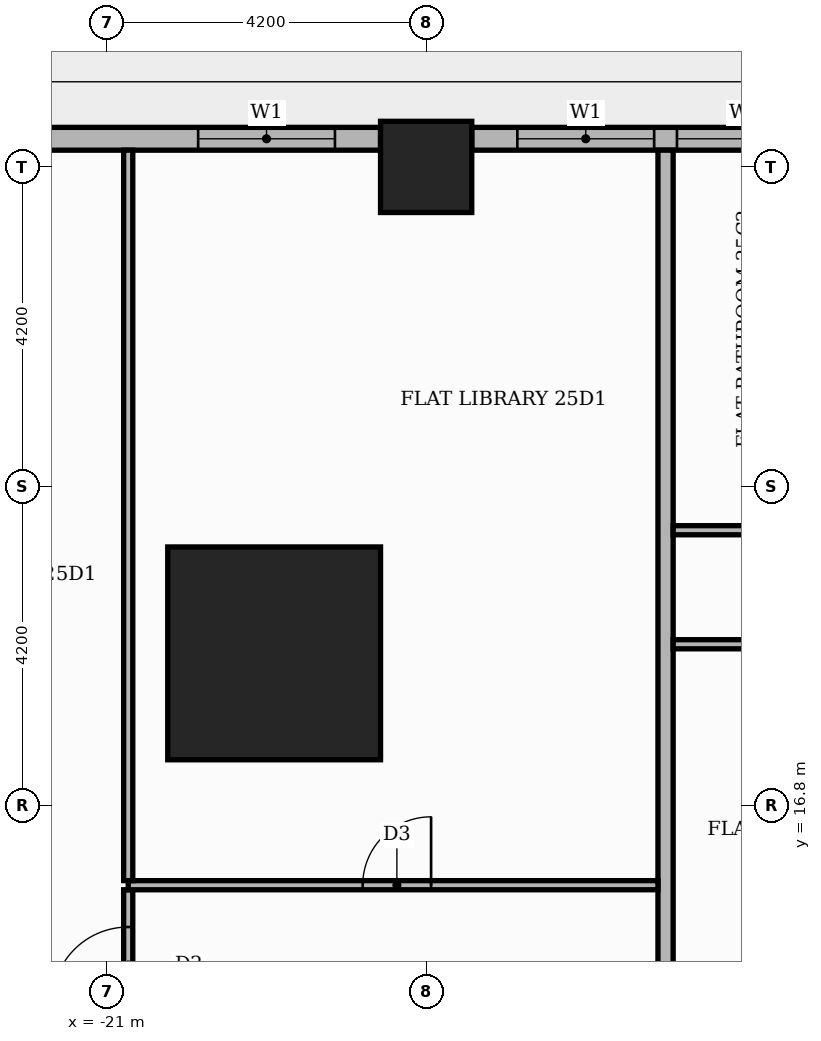
"""IFC4 building model, lengths in metres.
Left out: names, types, materials, properties, quantities, classifications, styles, units other than length and angle.
Written with IfcOpenShell. Run it as: python <this file> out.ifc"""

import sys

from ifc_helpers import new_model, si_unit, direction, frame, frame_2d, origin, origin_2d, place, context, subcontext, project, spatial, rectangle, extrude, element, fill, save


model = new_model("IFC4")
c1 = context("Model", 3, precision=1e-05, world=origin(), true_north=direction((0.0, 1.0)))
c2 = subcontext(c1, "Body", "Model", "MODEL_VIEW")
j1 = project(units=[si_unit("LENGTHUNIT", "METRE"), si_unit("PLANEANGLEUNIT", "RADIAN")], contexts=[c1])
p1 = place(None, origin())
s1 = spatial("IfcSite", under=j1, at=p1, CompositionType="ELEMENT")
p2 = place(p1, origin())
s2 = spatial("IfcBuilding", under=s1, at=p2, CompositionType="ELEMENT")
p3 = place(p2, frame((0.0, 0.0, 106.5)))
s3 = spatial("IfcBuildingStorey", under=s2, at=p3, CompositionType="ELEMENT", Elevation=106.5)
p4 = place(p3, frame((-18.8, 18.8, 0.0), z_axis=(0.0, 0.0, 1.0), x_axis=(1.0, 0.0, 0.0)))
e1 = element("IfcColumn", 1, at=p4, inside=s3, PredefinedType="COLUMN", context=c2, shape_type="SweptSolid", body=[
    extrude(rectangle(XDim=2.8, YDim=2.8, at=origin_2d()), origin(), (0.0, 0.0, 1.0), 3.9),
])
p5 = place(p3, frame((-16.8, 25.2, 0.0), z_axis=(0.0, 0.0, 1.0), x_axis=(1.0, 0.0, 0.0)))
e2 = element("IfcColumn", 2, at=p5, inside=s3, PredefinedType="COLUMN", context=c2, shape_type="SweptSolid", body=[
    extrude(rectangle(XDim=1.2, YDim=1.2, at=origin_2d()), origin(), (0.0, 0.0, 1.0), 3.9),
])
p6 = place(p3, frame((-9.0, 25.57, 0.0), z_axis=(0.0, 0.0, 1.0), x_axis=(-1.0, 0.0, 0.0)))
e3 = element("IfcWall", 3, at=p6, inside=s3, PredefinedType="STANDARD", context=c2, shape_type="SweptSolid", body=[
    extrude(rectangle(XDim=7.2, YDim=0.3, at=frame_2d((3.6, 0.0))), origin(), (0.0, 0.0, 1.0), 3.48),
])
p7 = place(p6, frame((0.6, 0.0, 0.9)))
e4 = element("IfcOpeningElement", 4, at=p7, cuts=e3, PredefinedType="OPENING", context=c2, shape_type="SweptSolid", body=[
    extrude(rectangle(XDim=1.8, YDim=2.1, at=frame_2d((0.9, 1.05))), frame((0.0, 0.16, 0.0), z_axis=(0.0, -1.0, 0.0), x_axis=(1.0, 0.0, 0.0)), (0.0, 0.0, 1.0), 0.32),
])
p8 = place(p6, frame((2.7, 0.0, 0.9)))
e5 = element("IfcOpeningElement", 5, at=p8, cuts=e3, PredefinedType="OPENING", context=c2, shape_type="SweptSolid", body=[
    extrude(rectangle(XDim=1.8, YDim=2.1, at=frame_2d((0.9, 1.05))), frame((0.0, 0.16, 0.0), z_axis=(0.0, -1.0, 0.0), x_axis=(1.0, 0.0, 0.0)), (0.0, 0.0, 1.0), 0.32),
])
p9 = place(p6, frame((4.8, 0.0, 0.9)))
e6 = element("IfcOpeningElement", 6, at=p9, cuts=e3, PredefinedType="OPENING", context=c2, shape_type="SweptSolid", body=[
    extrude(rectangle(XDim=1.8, YDim=2.1, at=frame_2d((0.9, 1.05))), frame((0.0, 0.16, 0.0), z_axis=(0.0, -1.0, 0.0), x_axis=(1.0, 0.0, 0.0)), (0.0, 0.0, 1.0), 0.32),
])
p10 = place(p3, frame((-17.4, 25.57, 0.0), z_axis=(0.0, 0.0, 1.0), x_axis=(-1.0, 0.0, 0.0)))
e7 = element("IfcWall", 7, at=p10, inside=s3, PredefinedType="STANDARD", context=c2, shape_type="SweptSolid", body=[
    extrude(rectangle(XDim=4.82, YDim=0.3, at=frame_2d((2.41, 0.0))), origin(), (0.0, 0.0, 1.0), 3.48),
])
p11 = place(p10, frame((0.6, 0.0, 0.9)))
e8 = element("IfcOpeningElement", 8, at=p11, cuts=e7, PredefinedType="OPENING", context=c2, shape_type="SweptSolid", body=[
    extrude(rectangle(XDim=1.8, YDim=2.1, at=frame_2d((0.9, 1.05))), frame((0.0, 0.16, 0.0), z_axis=(0.0, -1.0, 0.0), x_axis=(1.0, 0.0, 0.0)), (0.0, 0.0, 1.0), 0.32),
])
p12 = place(p3, frame((-20.72, 13.71, 0.0), z_axis=(0.0, 0.0, 1.0), x_axis=(0.0, 1.0, 0.0)))
e9 = element("IfcWall", 9, at=p12, inside=s3, PredefinedType="PARTITIONING", context=c2, shape_type="SweptSolid", body=[
    extrude(rectangle(XDim=1.98, YDim=0.12, at=frame_2d((0.99, 0.0))), origin(), (0.0, 0.0, 1.0), 3.48),
])
p13 = place(p12, frame((0.49, 0.0, 0.0)))
e10 = element("IfcOpeningElement", 10, at=p13, cuts=e9, PredefinedType="OPENING", context=c2, shape_type="SweptSolid", body=[
    extrude(rectangle(XDim=1.0, YDim=2.1, at=frame_2d((0.5, 1.05))), frame((0.0, 0.07, 0.0), z_axis=(0.0, -1.0, 0.0), x_axis=(1.0, 0.0, 0.0)), (0.0, 0.0, 1.0), 0.14),
])
p14 = place(p3, frame((-13.65, 13.75, 0.0), z_axis=(0.0, 0.0, 1.0), x_axis=(0.0, 1.0, 0.0)))
e11 = element("IfcWall", 11, at=p14, inside=s3, PredefinedType="PARTITIONING", context=c2, shape_type="SweptSolid", body=[
    extrude(rectangle(XDim=11.67, YDim=0.2, at=frame_2d((5.835, 0.0))), origin(), (0.0, 0.0, 1.0), 3.48),
])
p15 = place(p3, frame((-20.72, 15.75, 0.0), z_axis=(0.0, 0.0, 1.0), x_axis=(1.0, 0.0, 0.0)))
e12 = element("IfcWall", 12, at=p15, inside=s3, PredefinedType="PARTITIONING", context=c2, shape_type="SweptSolid", body=[
    extrude(rectangle(XDim=6.97, YDim=0.12, at=frame_2d((3.485, 0.0))), origin(), (0.0, 0.0, 1.0), 3.48),
])
p16 = place(p15, frame((3.085, 0.0, 0.0)))
e13 = element("IfcOpeningElement", 13, at=p16, cuts=e12, PredefinedType="OPENING", context=c2, shape_type="SweptSolid", body=[
    extrude(rectangle(XDim=0.9, YDim=2.1, at=frame_2d((0.45, 1.05))), frame((0.0, 0.07, 0.0), z_axis=(0.0, -1.0, 0.0), x_axis=(1.0, 0.0, 0.0)), (0.0, 0.0, 1.0), 0.14),
])
p17 = place(p3, frame((-20.72, 15.81, 0.0), z_axis=(0.0, 0.0, 1.0), x_axis=(0.0, 1.0, 0.0)))
e14 = element("IfcWall", 14, at=p17, inside=s3, PredefinedType="PARTITIONING", context=c2, shape_type="SweptSolid", body=[
    extrude(rectangle(XDim=9.61, YDim=0.12, at=frame_2d((4.805, 0.0))), origin(), (0.0, 0.0, 1.0), 3.48),
])
p18 = place(p3, frame((-13.55, 18.92, 0.0), z_axis=(0.0, 0.0, 1.0), x_axis=(1.0, 0.0, 0.0)))
e15 = element("IfcWall", 15, at=p18, inside=s3, PredefinedType="PARTITIONING", context=c2, shape_type="SweptSolid", body=[
    extrude(rectangle(XDim=12.5, YDim=0.12, at=frame_2d((6.25, 0.0))), origin(), (0.0, 0.0, 1.0), 3.48),
])
p19 = place(p18, frame((9.05, 0.0, 0.0)))
e16 = element("IfcOpeningElement", 16, at=p19, cuts=e15, PredefinedType="OPENING", context=c2, shape_type="SweptSolid", body=[
    extrude(rectangle(XDim=0.9, YDim=2.1, at=frame_2d((0.45, 1.05))), frame((0.0, 0.07, 0.0), z_axis=(0.0, -1.0, 0.0), x_axis=(1.0, 0.0, 0.0)), (0.0, 0.0, 1.0), 0.14),
])
p20 = place(p18, frame((4.7, 0.0, 0.0)))
e17 = element("IfcOpeningElement", 17, at=p20, cuts=e15, PredefinedType="OPENING", context=c2, shape_type="SweptSolid", body=[
    extrude(rectangle(XDim=0.9, YDim=2.1, at=frame_2d((0.45, 1.05))), frame((0.0, 0.07, 0.0), z_axis=(0.0, -1.0, 0.0), x_axis=(1.0, 0.0, 0.0)), (0.0, 0.0, 1.0), 0.14),
])
p21 = place(p18, frame((1.4, 0.0, 0.0)))
e18 = element("IfcOpeningElement", 18, at=p21, cuts=e15, PredefinedType="OPENING", context=c2, shape_type="SweptSolid", body=[
    extrude(rectangle(XDim=0.9, YDim=2.1, at=frame_2d((0.45, 1.05))), frame((0.0, 0.07, 0.0), z_axis=(0.0, -1.0, 0.0), x_axis=(1.0, 0.0, 0.0)), (0.0, 0.0, 1.0), 0.14),
])
p22 = place(p3, frame((-13.55, 20.42, 0.0), z_axis=(0.0, 0.0, 1.0), x_axis=(1.0, 0.0, 0.0)))
e19 = element("IfcWall", 19, at=p22, inside=s3, PredefinedType="PARTITIONING", context=c2, shape_type="SweptSolid", body=[
    extrude(rectangle(XDim=18.7, YDim=0.12, at=frame_2d((9.35, 0.0))), origin(), (0.0, 0.0, 1.0), 3.48),
])
p23 = place(p22, frame((14.1, 0.0, 0.0)))
e20 = element("IfcOpeningElement", 20, at=p23, cuts=e19, PredefinedType="OPENING", context=c2, shape_type="SweptSolid", body=[
    extrude(rectangle(XDim=1.0, YDim=2.1, at=frame_2d((0.5, 1.05))), frame((0.0, 0.07, 0.0), z_axis=(0.0, -1.0, 0.0), x_axis=(1.0, 0.0, 0.0)), (0.0, 0.0, 1.0), 0.14),
])
p24 = place(p22, frame((6.8, 0.0, 0.0)))
e21 = element("IfcOpeningElement", 21, at=p24, cuts=e19, PredefinedType="OPENING", context=c2, shape_type="SweptSolid", body=[
    extrude(rectangle(XDim=0.9, YDim=2.1, at=frame_2d((0.45, 1.05))), frame((0.0, 0.07, 0.0), z_axis=(0.0, -1.0, 0.0), x_axis=(1.0, 0.0, 0.0)), (0.0, 0.0, 1.0), 0.14),
])
p25 = place(p8, origin())
e22 = element("IfcWindow", 22, at=p25, inside=s3, PartitioningType="SINGLE_PANEL", PredefinedType="WINDOW", context=c2, shape_type="SweptSolid", body=[
    extrude(rectangle(XDim=1.8, YDim=2.1, at=frame_2d((0.9, 1.05))), frame((0.0, 0.03, 0.0), z_axis=(0.0, -1.0, 0.0), x_axis=(1.0, 0.0, 0.0)), (0.0, 0.0, 1.0), 0.06),
])
fill(e5, e22)
p26 = place(p9, origin())
e23 = element("IfcWindow", 23, at=p26, inside=s3, PartitioningType="SINGLE_PANEL", PredefinedType="WINDOW", context=c2, shape_type="SweptSolid", body=[
    extrude(rectangle(XDim=1.8, YDim=2.1, at=frame_2d((0.9, 1.05))), frame((0.0, 0.03, 0.0), z_axis=(0.0, -1.0, 0.0), x_axis=(1.0, 0.0, 0.0)), (0.0, 0.0, 1.0), 0.06),
])
fill(e6, e23)
p27 = place(p11, origin())
e24 = element("IfcWindow", 24, at=p27, inside=s3, PartitioningType="SINGLE_PANEL", PredefinedType="WINDOW", context=c2, shape_type="SweptSolid", body=[
    extrude(rectangle(XDim=1.8, YDim=2.1, at=frame_2d((0.9, 1.05))), frame((0.0, 0.03, 0.0), z_axis=(0.0, -1.0, 0.0), x_axis=(1.0, 0.0, 0.0)), (0.0, 0.0, 1.0), 0.06),
])
fill(e8, e24)
p28 = place(p16, origin())
e25 = element("IfcDoor", 25, at=p28, inside=s3, OperationType="SINGLE_SWING_RIGHT", PredefinedType="DOOR", context=c2, shape_type="SweptSolid", body=[
    extrude(rectangle(XDim=0.9, YDim=2.1, at=frame_2d((0.45, 1.05))), frame((0.0, 0.025, 0.0), z_axis=(0.0, -1.0, 0.0), x_axis=(1.0, 0.0, 0.0)), (0.0, 0.0, 1.0), 0.05),
])
fill(e13, e25)
p29 = place(p13, origin())
e26 = element("IfcDoor", 26, at=p29, inside=s3, OperationType="SINGLE_SWING_LEFT", PredefinedType="DOOR", context=c2, shape_type="SweptSolid", body=[
    extrude(rectangle(XDim=1.0, YDim=2.1, at=frame_2d((0.5, 1.05))), frame((0.0, 0.025, 0.0), z_axis=(0.0, -1.0, 0.0), x_axis=(1.0, 0.0, 0.0)), (0.0, 0.0, 1.0), 0.05),
])
fill(e10, e26)
save(model, sys.argv[1])
